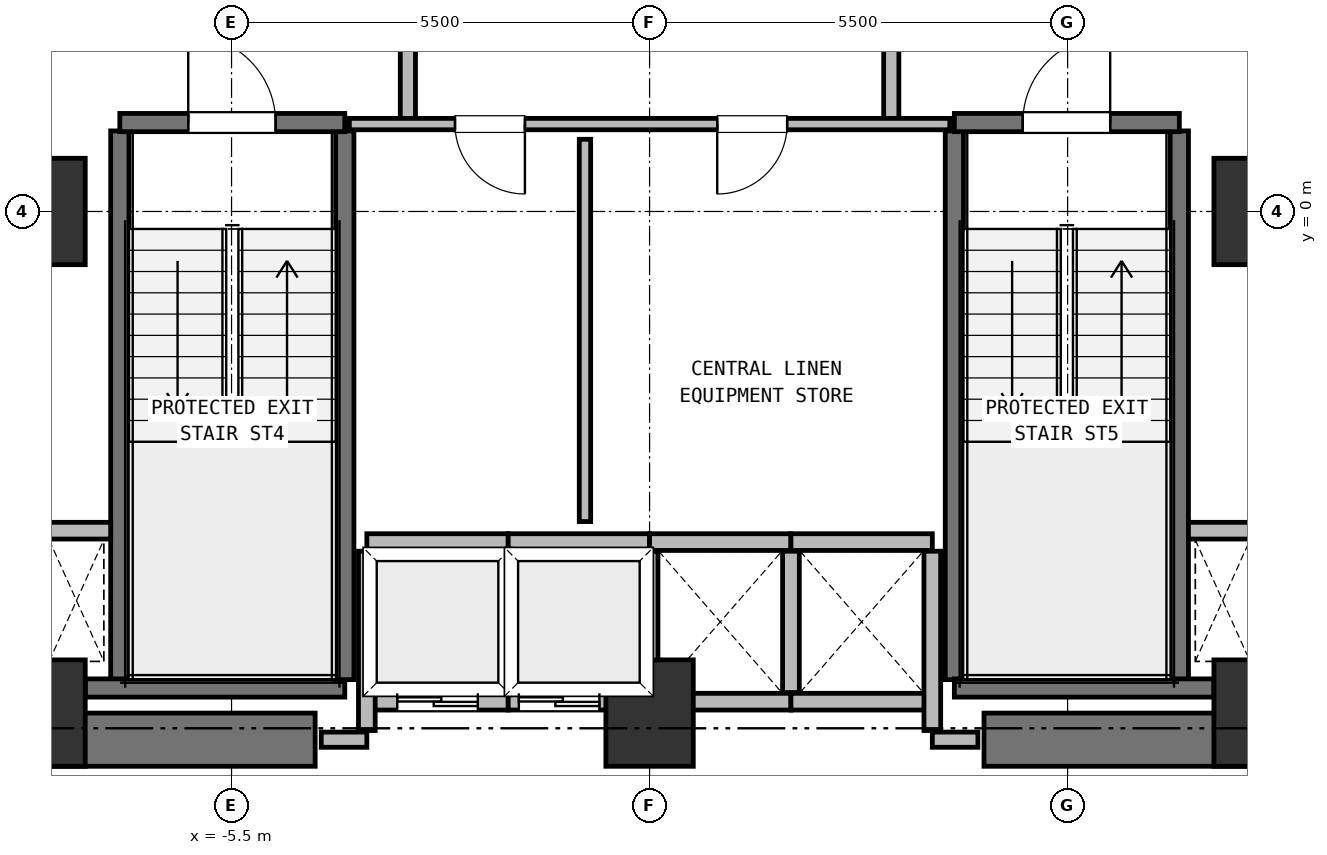
"""IFC4 building model, lengths in metres.
Left out: names, types, materials, properties, quantities, classifications, styles, units other than length and angle.
Written with IfcOpenShell. Run it as: python <this file> out.ifc"""

import sys

from ifc_helpers import new_model, si_unit, direction, frame, frame_2d, origin, origin_2d, place, context, subcontext, project, spatial, rectangle, extrude, element, fill, save


model = new_model("IFC4")
c1 = context("Model", 3, precision=1e-05, world=origin(), true_north=direction((0.0, 1.0)))
c2 = subcontext(c1, "Body", "Model", "MODEL_VIEW")
j1 = project(units=[si_unit("LENGTHUNIT", "METRE"), si_unit("PLANEANGLEUNIT", "RADIAN")], contexts=[c1])
p1 = place(None, origin())
s1 = spatial("IfcSite", under=j1, at=p1, CompositionType="ELEMENT")
p2 = place(p1, origin())
s2 = spatial("IfcBuilding", under=s1, at=p2, CompositionType="ELEMENT")
p3 = place(p2, frame((0.0, 0.0, 34.25)))
s3 = spatial("IfcBuildingStorey", under=s2, at=p3, CompositionType="ELEMENT", Elevation=34.25)
for number, where, z_axis, x_axis in (
    (1, (-8.0, -6.6, 0.0), (0.0, 0.0, 1.0), (1.0, 0.0, 0.0)),
    (2, (0.0, -6.6, 0.0), (0.0, 0.0, 1.0), (1.0, 0.0, 0.0)),
    (3, (8.0, -6.6, 0.0), (0.0, 0.0, 1.0), (1.0, 0.0, 0.0)),
    (4, (8.0, 0.0, 0.0), (0.0, 0.0, 1.0), (1.0, 0.0, 0.0)),
    (5, (-8.0, 0.0, 0.0), (0.0, 0.0, 1.0), (1.0, 0.0, 0.0)),
):
    element("IfcColumn", number, at=place(p3, frame(where, z_axis=z_axis, x_axis=x_axis)), inside=s3, PredefinedType="COLUMN", context=c2, shape_type="SweptSolid", body=[
        extrude(rectangle(XDim=1.15, YDim=1.4, at=origin_2d()), origin(), (0.0, 0.0, 1.0), 3.75),
    ])
for number, where, z_axis, x_axis in (
    (6, (-8.35, -6.95, 0.0), (0.0, 0.0, 1.0), (1.0, 0.0, 0.0)),
    (7, (4.4, -6.95, 0.0), (0.0, 0.0, 1.0), (1.0, 0.0, 0.0)),
):
    element("IfcWall", number, at=place(p3, frame(where, z_axis=z_axis, x_axis=x_axis)), inside=s3, PredefinedType="SHEAR", context=c2, shape_type="SweptSolid", body=[
        extrude(rectangle(XDim=3.95, YDim=0.7, at=frame_2d((1.975, 0.0))), origin(), (0.0, 0.0, 1.0), 3.5),
    ])
p4 = place(p3, frame((-6.97, -6.16, 0.0), z_axis=(0.0, 0.0, 1.0), x_axis=(0.0, 1.0, 0.0)))
e8 = element("IfcWall", 8, at=p4, inside=s3, PredefinedType="SHEAR", context=c2, shape_type="SweptSolid", body=[
    extrude(rectangle(XDim=7.22, YDim=0.24, at=frame_2d((3.61, 0.0))), origin(), (0.0, 0.0, 1.0), 3.5),
])
p5 = place(p3, frame((-7.425, -6.27, 0.0), z_axis=(0.0, 0.0, 1.0), x_axis=(1.0, 0.0, 0.0)))
e9 = element("IfcWall", 9, at=p5, inside=s3, PredefinedType="SHEAR", context=c2, shape_type="SweptSolid", body=[
    extrude(rectangle(XDim=3.415, YDim=0.24, at=frame_2d((1.708, 0.0))), origin(), (0.0, 0.0, 1.0), 3.5),
])
p6 = place(p3, frame((-4.01, -6.16, 0.0), z_axis=(0.0, 0.0, 1.0), x_axis=(0.0, 1.0, 0.0)))
e10 = element("IfcWall", 10, at=p6, inside=s3, PredefinedType="SHEAR", context=c2, shape_type="SweptSolid", body=[
    extrude(rectangle(XDim=7.22, YDim=0.24, at=frame_2d((3.61, 0.0))), origin(), (0.0, 0.0, 1.0), 3.5),
])
p7 = place(p3, frame((-6.97, 1.17, 0.0), z_axis=(0.0, 0.0, 1.0), x_axis=(1.0, 0.0, 0.0)))
e11 = element("IfcWall", 11, at=p7, inside=s3, PredefinedType="SHEAR", context=c2, shape_type="SweptSolid", body=[
    extrude(rectangle(XDim=2.96, YDim=0.24, at=frame_2d((1.48, 0.0))), origin(), (0.0, 0.0, 1.0), 3.5),
])
p8 = place(p7, frame((0.9, 0.0, 0.0)))
e12 = element("IfcOpeningElement", 12, at=p8, cuts=e11, PredefinedType="OPENING", context=c2, shape_type="SweptSolid", body=[
    extrude(rectangle(XDim=1.15, YDim=2.15, at=frame_2d((0.575, 1.075))), frame((0.0, 0.13, 0.0), z_axis=(0.0, -1.0, 0.0), x_axis=(1.0, 0.0, 0.0)), (0.0, 0.0, 1.0), 0.26),
])
for number, where, z_axis, x_axis in (
    (13, (4.01, -6.16, 0.0), (0.0, 0.0, 1.0), (0.0, 1.0, 0.0)),
    (14, (6.97, -6.16, 0.0), (0.0, 0.0, 1.0), (0.0, 1.0, 0.0)),
):
    element("IfcWall", number, at=place(p3, frame(where, z_axis=z_axis, x_axis=x_axis)), inside=s3, PredefinedType="SHEAR", context=c2, shape_type="SweptSolid", body=[
        extrude(rectangle(XDim=7.22, YDim=0.24, at=frame_2d((3.61, 0.0))), origin(), (0.0, 0.0, 1.0), 3.5),
    ])
p9 = place(p3, frame((4.01, -6.27, 0.0), z_axis=(0.0, 0.0, 1.0), x_axis=(1.0, 0.0, 0.0)))
e15 = element("IfcWall", 15, at=p9, inside=s3, PredefinedType="SHEAR", context=c2, shape_type="SweptSolid", body=[
    extrude(rectangle(XDim=3.415, YDim=0.24, at=frame_2d((1.708, 0.0))), origin(), (0.0, 0.0, 1.0), 3.5),
])
p10 = place(p3, frame((4.01, 1.17, 0.0), z_axis=(0.0, 0.0, 1.0), x_axis=(1.0, 0.0, 0.0)))
e16 = element("IfcWall", 16, at=p10, inside=s3, PredefinedType="SHEAR", context=c2, shape_type="SweptSolid", body=[
    extrude(rectangle(XDim=2.96, YDim=0.24, at=frame_2d((1.48, 0.0))), origin(), (0.0, 0.0, 1.0), 3.5),
])
p11 = place(p10, frame((0.9, 0.0, 0.0)))
e17 = element("IfcOpeningElement", 17, at=p11, cuts=e16, PredefinedType="OPENING", context=c2, shape_type="SweptSolid", body=[
    extrude(rectangle(XDim=1.15, YDim=2.15, at=frame_2d((0.575, 1.075))), frame((0.0, 0.13, 0.0), z_axis=(0.0, -1.0, 0.0), x_axis=(1.0, 0.0, 0.0)), (0.0, 0.0, 1.0), 0.26),
])
for number, where, z_axis, x_axis in (
    (18, (-8.0, -4.2, 0.0), (0.0, 0.0, 1.0), (1.0, 0.0, 0.0)),
    (19, (7.09, -4.2, 0.0), (0.0, 0.0, 1.0), (1.0, 0.0, 0.0)),
):
    element("IfcWall", number, at=place(p3, frame(where, z_axis=z_axis, x_axis=x_axis)), inside=s3, PredefinedType="PARTITIONING", context=c2, shape_type="SweptSolid", body=[
        extrude(rectangle(XDim=0.91, YDim=0.22, at=frame_2d((0.455, 0.0))), origin(), (0.0, 0.0, 1.0), 3.5),
    ])
p12 = place(p3, frame((-3.72, -6.45, 0.0), z_axis=(0.0, 0.0, 1.0), x_axis=(1.0, 0.0, 0.0)))
e20 = element("IfcWall", 20, at=p12, inside=s3, PredefinedType="PARTITIONING", context=c2, shape_type="SweptSolid", body=[
    extrude(rectangle(XDim=1.86, YDim=0.22, at=frame_2d((0.93, 0.0))), origin(), (0.0, 0.0, 1.0), 3.08),
])
p13 = place(p12, frame((0.4, 0.0, 0.0)))
e21 = element("IfcOpeningElement", 21, at=p13, cuts=e20, PredefinedType="OPENING", context=c2, shape_type="SweptSolid", body=[
    extrude(rectangle(XDim=1.06, YDim=2.15, at=frame_2d((0.53, 1.075))), frame((0.0, 0.12, 0.0), z_axis=(0.0, -1.0, 0.0), x_axis=(1.0, 0.0, 0.0)), (0.0, 0.0, 1.0), 0.24),
])
p14 = place(p3, frame((-3.72, -4.35, 0.0), z_axis=(0.0, 0.0, 1.0), x_axis=(1.0, 0.0, 0.0)))
e22 = element("IfcWall", 22, at=p14, inside=s3, PredefinedType="PARTITIONING", context=c2, shape_type="SweptSolid", body=[
    extrude(rectangle(XDim=1.86, YDim=0.22, at=frame_2d((0.93, 0.0))), origin(), (0.0, 0.0, 1.0), 3.5),
])
p15 = place(p3, frame((-3.72, -6.83, 0.0), z_axis=(0.0, 0.0, 1.0), x_axis=(0.0, 1.0, 0.0)))
e23 = element("IfcWall", 23, at=p15, inside=s3, PredefinedType="PARTITIONING", context=c2, shape_type="SweptSolid", body=[
    extrude(rectangle(XDim=2.36, YDim=0.22, at=frame_2d((1.18, 0.0))), origin(), (0.0, 0.0, 1.0), 3.5),
])
p16 = place(p3, frame((-1.86, -6.33, 0.0), z_axis=(0.0, 0.0, 1.0), x_axis=(0.0, 1.0, 0.0)))
e24 = element("IfcWall", 24, at=p16, inside=s3, PredefinedType="PARTITIONING", context=c2, shape_type="SweptSolid", body=[
    extrude(rectangle(XDim=1.86, YDim=0.22, at=frame_2d((0.93, 0.0))), origin(), (0.0, 0.0, 1.0), 3.5),
])
p17 = place(p3, frame((-1.86, -6.45, 0.0), z_axis=(0.0, 0.0, 1.0), x_axis=(1.0, 0.0, 0.0)))
e25 = element("IfcWall", 25, at=p17, inside=s3, PredefinedType="PARTITIONING", context=c2, shape_type="SweptSolid", body=[
    extrude(rectangle(XDim=1.86, YDim=0.22, at=frame_2d((0.93, 0.0))), origin(), (0.0, 0.0, 1.0), 3.08),
])
p18 = place(p17, frame((0.14, 0.0, 0.0)))
e26 = element("IfcOpeningElement", 26, at=p18, cuts=e25, PredefinedType="OPENING", context=c2, shape_type="SweptSolid", body=[
    extrude(rectangle(XDim=1.06, YDim=2.15, at=frame_2d((0.53, 1.075))), frame((0.0, 0.12, 0.0), z_axis=(0.0, -1.0, 0.0), x_axis=(1.0, 0.0, 0.0)), (0.0, 0.0, 1.0), 0.24),
])
for number, where, z_axis, x_axis in (
    (27, (-1.86, -4.35, 0.0), (0.0, 0.0, 1.0), (1.0, 0.0, 0.0)),
    (28, (0.0, -6.33, 0.0), (0.0, 0.0, 1.0), (0.0, 1.0, 0.0)),
):
    element("IfcWall", number, at=place(p3, frame(where, z_axis=z_axis, x_axis=x_axis)), inside=s3, PredefinedType="PARTITIONING", context=c2, shape_type="SweptSolid", body=[
        extrude(rectangle(XDim=1.86, YDim=0.22, at=frame_2d((0.93, 0.0))), origin(), (0.0, 0.0, 1.0), 3.5),
    ])
p19 = place(p3, frame((0.0, -6.45, 0.0), z_axis=(0.0, 0.0, 1.0), x_axis=(1.0, 0.0, 0.0)))
e29 = element("IfcWall", 29, at=p19, inside=s3, PredefinedType="PARTITIONING", context=c2, shape_type="SweptSolid", body=[
    extrude(rectangle(XDim=1.86, YDim=0.22, at=frame_2d((0.93, 0.0))), origin(), (0.0, 0.0, 1.0), 3.08),
])
for number, where, z_axis, x_axis in (
    (30, (0.0, -4.35, 0.0), (0.0, 0.0, 1.0), (1.0, 0.0, 0.0)),
    (31, (1.86, -6.33, 0.0), (0.0, 0.0, 1.0), (0.0, 1.0, 0.0)),
):
    element("IfcWall", number, at=place(p3, frame(where, z_axis=z_axis, x_axis=x_axis)), inside=s3, PredefinedType="PARTITIONING", context=c2, shape_type="SweptSolid", body=[
        extrude(rectangle(XDim=1.86, YDim=0.22, at=frame_2d((0.93, 0.0))), origin(), (0.0, 0.0, 1.0), 3.5),
    ])
p20 = place(p3, frame((1.86, -6.45, 0.0), z_axis=(0.0, 0.0, 1.0), x_axis=(1.0, 0.0, 0.0)))
e32 = element("IfcWall", 32, at=p20, inside=s3, PredefinedType="PARTITIONING", context=c2, shape_type="SweptSolid", body=[
    extrude(rectangle(XDim=1.86, YDim=0.22, at=frame_2d((0.93, 0.0))), origin(), (0.0, 0.0, 1.0), 3.08),
])
p21 = place(p3, frame((1.86, -4.35, 0.0), z_axis=(0.0, 0.0, 1.0), x_axis=(1.0, 0.0, 0.0)))
e33 = element("IfcWall", 33, at=p21, inside=s3, PredefinedType="PARTITIONING", context=c2, shape_type="SweptSolid", body=[
    extrude(rectangle(XDim=1.86, YDim=0.22, at=frame_2d((0.93, 0.0))), origin(), (0.0, 0.0, 1.0), 3.5),
])
p22 = place(p3, frame((3.72, -6.83, 0.0), z_axis=(0.0, 0.0, 1.0), x_axis=(0.0, 1.0, 0.0)))
e34 = element("IfcWall", 34, at=p22, inside=s3, PredefinedType="PARTITIONING", context=c2, shape_type="SweptSolid", body=[
    extrude(rectangle(XDim=2.36, YDim=0.22, at=frame_2d((1.18, 0.0))), origin(), (0.0, 0.0, 1.0), 3.5),
])
p23 = place(p3, frame((-3.18, 1.15, 0.0), z_axis=(0.0, 0.0, 1.0), x_axis=(0.0, 1.0, 0.0)))
e35 = element("IfcWall", 35, at=p23, inside=s3, PredefinedType="PARTITIONING", context=c2, shape_type="SweptSolid", body=[
    extrude(rectangle(XDim=3.3, YDim=0.2, at=frame_2d((1.65, 0.0))), origin(), (0.0, 0.0, 1.0), 3.5),
])
p24 = place(p23, frame((1.08, 0.0, 0.0)))
e36 = element("IfcOpeningElement", 36, at=p24, cuts=e35, PredefinedType="OPENING", context=c2, shape_type="SweptSolid", body=[
    extrude(rectangle(XDim=1.15, YDim=2.15, at=frame_2d((0.575, 1.075))), frame((0.0, 0.11, 0.0), z_axis=(0.0, -1.0, 0.0), x_axis=(1.0, 0.0, 0.0)), (0.0, 0.0, 1.0), 0.22),
])
p25 = place(p3, frame((3.18, 1.15, 0.0), z_axis=(0.0, 0.0, 1.0), x_axis=(0.0, 1.0, 0.0)))
e37 = element("IfcWall", 37, at=p25, inside=s3, PredefinedType="PARTITIONING", context=c2, shape_type="SweptSolid", body=[
    extrude(rectangle(XDim=3.3, YDim=0.2, at=frame_2d((1.65, 0.0))), origin(), (0.0, 0.0, 1.0), 3.5),
])
p26 = place(p25, frame((1.08, 0.0, 0.0)))
e38 = element("IfcOpeningElement", 38, at=p26, cuts=e37, PredefinedType="OPENING", context=c2, shape_type="SweptSolid", body=[
    extrude(rectangle(XDim=1.15, YDim=2.15, at=frame_2d((0.575, 1.075))), frame((0.0, 0.11, 0.0), z_axis=(0.0, -1.0, 0.0), x_axis=(1.0, 0.0, 0.0)), (0.0, 0.0, 1.0), 0.22),
])
p27 = place(p3, frame((3.95, 1.15, 0.0), z_axis=(0.0, 0.0, 1.0), x_axis=(-1.0, 0.0, 0.0)))
e39 = element("IfcWall", 39, at=p27, inside=s3, PredefinedType="PARTITIONING", context=c2, shape_type="SweptSolid", body=[
    extrude(rectangle(XDim=7.9, YDim=0.15, at=frame_2d((3.95, 0.0))), origin(), (0.0, 0.0, 1.0), 3.5),
])
p28 = place(p27, frame((5.59, 0.0, 0.0)))
e40 = element("IfcOpeningElement", 40, at=p28, cuts=e39, PredefinedType="OPENING", context=c2, shape_type="SweptSolid", body=[
    extrude(rectangle(XDim=0.92, YDim=2.05, at=frame_2d((0.46, 1.025))), frame((0.0, 0.085, 0.0), z_axis=(0.0, -1.0, 0.0), x_axis=(1.0, 0.0, 0.0)), (0.0, 0.0, 1.0), 0.17),
])
p29 = place(p27, frame((2.14, 0.0, 0.0)))
e41 = element("IfcOpeningElement", 41, at=p29, cuts=e39, PredefinedType="OPENING", context=c2, shape_type="SweptSolid", body=[
    extrude(rectangle(XDim=0.92, YDim=2.05, at=frame_2d((0.46, 1.025))), frame((0.0, 0.085, 0.0), z_axis=(0.0, -1.0, 0.0), x_axis=(1.0, 0.0, 0.0)), (0.0, 0.0, 1.0), 0.17),
])
for number, where, z_axis, x_axis in (
    (42, (-4.32, -6.95, 0.0), (0.0, 0.0, 1.0), (1.0, 0.0, 0.0)),
    (43, (3.72, -6.95, 0.0), (0.0, 0.0, 1.0), (1.0, 0.0, 0.0)),
):
    element("IfcWall", number, at=place(p3, frame(where, z_axis=z_axis, x_axis=x_axis)), inside=s3, PredefinedType="PARTITIONING", context=c2, shape_type="SweptSolid", body=[
        extrude(rectangle(XDim=0.6, YDim=0.2, at=frame_2d((0.3, 0.0))), origin(), (0.0, 0.0, 1.0), 3.5),
    ])
p30 = place(p3, frame((-0.85, -4.08, 0.0), z_axis=(0.0, 0.0, 1.0), x_axis=(0.0, 1.0, 0.0)))
e44 = element("IfcWall", 44, at=p30, inside=s3, PredefinedType="PARTITIONING", context=c2, shape_type="SweptSolid", body=[
    extrude(rectangle(XDim=5.03, YDim=0.15, at=frame_2d((2.515, 0.0))), origin(), (0.0, 0.0, 1.0), 3.5),
])
p31 = place(p8, origin())
e45 = element("IfcDoor", 45, at=p31, inside=s3, OperationType="SINGLE_SWING_LEFT", PredefinedType="DOOR", context=c2, shape_type="SweptSolid", body=[
    extrude(rectangle(XDim=1.15, YDim=2.15, at=frame_2d((0.575, 1.075))), frame((0.0, 0.025, 0.0), z_axis=(0.0, -1.0, 0.0), x_axis=(1.0, 0.0, 0.0)), (0.0, 0.0, 1.0), 0.05),
])
fill(e12, e45)
p32 = place(p11, origin())
e46 = element("IfcDoor", 46, at=p32, inside=s3, OperationType="SINGLE_SWING_RIGHT", PredefinedType="DOOR", context=c2, shape_type="SweptSolid", body=[
    extrude(rectangle(XDim=1.15, YDim=2.15, at=frame_2d((0.575, 1.075))), frame((0.0, 0.025, 0.0), z_axis=(0.0, -1.0, 0.0), x_axis=(1.0, 0.0, 0.0)), (0.0, 0.0, 1.0), 0.05),
])
fill(e17, e46)
p33 = place(p13, origin())
e47 = element("IfcDoor", 47, at=p33, inside=s3, OperationType="DOUBLE_DOOR_SLIDING", PredefinedType="DOOR", context=c2, shape_type="SweptSolid", body=[
    extrude(rectangle(XDim=1.06, YDim=2.15, at=frame_2d((0.53, 1.075))), frame((0.0, 0.025, 0.0), z_axis=(0.0, -1.0, 0.0), x_axis=(1.0, 0.0, 0.0)), (0.0, 0.0, 1.0), 0.05),
])
fill(e21, e47)
p34 = place(p18, origin())
e48 = element("IfcDoor", 48, at=p34, inside=s3, OperationType="DOUBLE_DOOR_SLIDING", PredefinedType="DOOR", context=c2, shape_type="SweptSolid", body=[
    extrude(rectangle(XDim=1.06, YDim=2.15, at=frame_2d((0.53, 1.075))), frame((0.0, 0.025, 0.0), z_axis=(0.0, -1.0, 0.0), x_axis=(1.0, 0.0, 0.0)), (0.0, 0.0, 1.0), 0.05),
])
fill(e26, e48)
p35 = place(p28, origin())
e49 = element("IfcDoor", 49, at=p35, inside=s3, OperationType="SINGLE_SWING_LEFT", PredefinedType="DOOR", context=c2, shape_type="SweptSolid", body=[
    extrude(rectangle(XDim=0.92, YDim=2.05, at=frame_2d((0.46, 1.025))), frame((0.0, 0.025, 0.0), z_axis=(0.0, -1.0, 0.0), x_axis=(1.0, 0.0, 0.0)), (0.0, 0.0, 1.0), 0.05),
])
fill(e40, e49)
p36 = place(p29, origin())
e50 = element("IfcDoor", 50, at=p36, inside=s3, OperationType="SINGLE_SWING_RIGHT", PredefinedType="DOOR", context=c2, shape_type="SweptSolid", body=[
    extrude(rectangle(XDim=0.92, YDim=2.05, at=frame_2d((0.46, 1.025))), frame((0.0, 0.025, 0.0), z_axis=(0.0, -1.0, 0.0), x_axis=(1.0, 0.0, 0.0)), (0.0, 0.0, 1.0), 0.05),
])
fill(e41, e50)
save(model, sys.argv[1])
